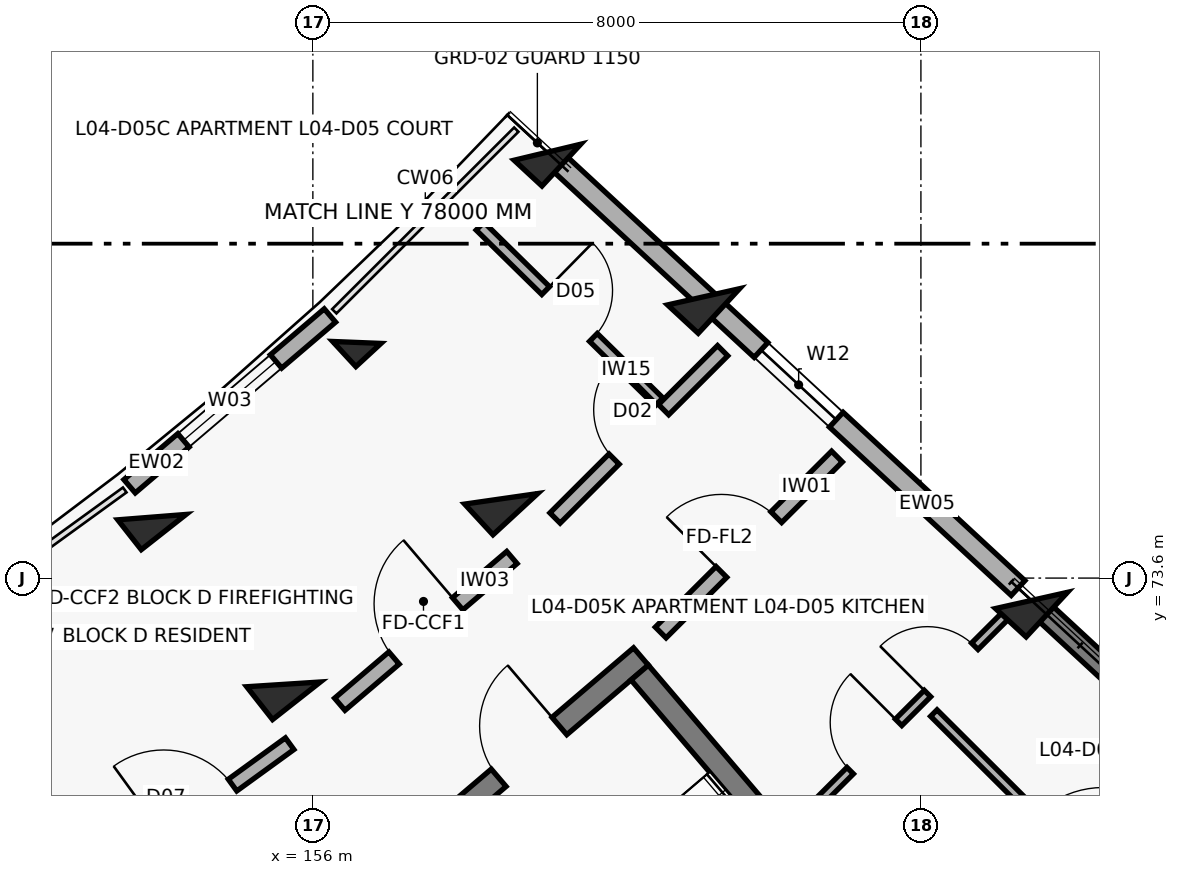
"""IFC4 building model, lengths in metres.
Left out: names, types, materials, properties, quantities, classifications, styles, units other than length and angle.
Written with IfcOpenShell. Run it as: python <this file> out.ifc"""

import sys

from ifc_helpers import new_model, si_unit, direction, frame, frame_2d, origin, origin_2d, place, context, subcontext, project, spatial, rectangle, extrude, element, fill, save


model = new_model("IFC4")
c1 = context("Model", 3, precision=1e-05, world=origin(), true_north=direction((0.0, 1.0)))
c2 = subcontext(c1, "Body", "Model", "MODEL_VIEW")
j1 = project(units=[si_unit("LENGTHUNIT", "METRE"), si_unit("PLANEANGLEUNIT", "RADIAN")], contexts=[c1])
p1 = place(None, origin())
s1 = spatial("IfcSite", under=j1, at=p1, CompositionType="ELEMENT")
p2 = place(p1, origin())
s2 = spatial("IfcBuilding", under=s1, at=p2, CompositionType="ELEMENT")
p3 = place(p2, frame((0.0, 0.0, 14.3)))
s3 = spatial("IfcBuildingStorey", under=s2, at=p3, CompositionType="ELEMENT", Elevation=14.3)
p4 = place(p3, frame((153.883, 74.402, 0.0), z_axis=(0.0, 0.0, 1.0), x_axis=(0.618408395358, -0.785856893175, 0.0)))
e1 = element("IfcColumn", 1, at=p4, inside=s3, PredefinedType="COLUMN", context=c2, shape_type="SweptSolid", body=[
    extrude(rectangle(XDim=0.5, YDim=0.75, at=origin_2d()), origin(), (0.0, 0.0, 1.0), 3.1),
])
p5 = place(p3, frame((155.614, 72.202, 0.0), z_axis=(0.0, 0.0, 1.0), x_axis=(0.618408395358, -0.785856893175, 0.0)))
e2 = element("IfcColumn", 2, at=p5, inside=s3, PredefinedType="COLUMN", context=c2, shape_type="SweptSolid", body=[
    extrude(rectangle(XDim=0.55, YDim=0.8, at=origin_2d()), origin(), (0.0, 0.0, 1.0), 3.1),
])
p6 = place(p3, frame((156.579, 76.701, 0.0), z_axis=(0.0, 0.0, 1.0), x_axis=(0.678159669868, -0.73491459515, 0.0)))
e3 = element("IfcColumn", 3, at=p6, inside=s3, PredefinedType="COLUMN", context=c2, shape_type="SweptSolid", body=[
    extrude(rectangle(XDim=0.45, YDim=0.45, at=origin_2d()), origin(), (0.0, 0.0, 1.0), 3.1),
])
for number, where, z_axis, x_axis in (
    (4, (158.477, 74.643, 0.0), (0.0, 0.0, 1.0), (0.678, -0.735, 0.0)),
    (5, (162.465, 70.322, 0.0), (0.0, 0.0, 1.0), (0.678, -0.735, 0.0)),
):
    element("IfcColumn", number, at=place(p3, frame(where, z_axis=z_axis, x_axis=x_axis)), inside=s3, PredefinedType="COLUMN", context=c2, shape_type="SweptSolid", body=[
        extrude(rectangle(XDim=0.55, YDim=0.8, at=origin_2d()), origin(), (0.0, 0.0, 1.0), 3.1),
    ])
p7 = place(p3, frame((159.086, 79.204, 0.0), z_axis=(0.0, 0.0, 1.0), x_axis=(0.733729864503, -0.679441304262, 0.0)))
e6 = element("IfcColumn", 6, at=p7, inside=s3, PredefinedType="COLUMN", context=c2, shape_type="SweptSolid", body=[
    extrude(rectangle(XDim=0.5, YDim=0.75, at=origin_2d()), origin(), (0.0, 0.0, 1.0), 3.1),
])
for number, where, z_axis, x_axis in (
    (7, (161.14, 77.301, 0.0), (0.0, 0.0, 1.0), (0.734, -0.679, 0.0)),
    (8, (165.455, 73.306, 0.0), (0.0, 0.0, 1.0), (0.734, -0.679, 0.0)),
):
    element("IfcColumn", number, at=place(p3, frame(where, z_axis=z_axis, x_axis=x_axis)), inside=s3, PredefinedType="COLUMN", context=c2, shape_type="SweptSolid", body=[
        extrude(rectangle(XDim=0.55, YDim=0.8, at=origin_2d()), origin(), (0.0, 0.0, 1.0), 3.1),
    ])
p8 = place(p3, frame((165.587, 73.184, 0.0), z_axis=(0.0, 0.0, 1.0), x_axis=(0.733739663667, -0.679430721974, 0.0)))
e9 = element("IfcWall", 9, at=p8, inside=s3, PredefinedType="SHEAR", context=c2, shape_type="SweptSolid", body=[
    extrude(rectangle(XDim=4.72, YDim=0.27, at=frame_2d((2.36, 0.0))), origin(), (0.0, 0.0, 1.0), 2.86),
])
p9 = place(p3, frame((153.589, 74.808, 0.0), z_axis=(0.0, 0.0, 1.0), x_axis=(0.760985425115, 0.648768974876, 0.0)))
e10 = element("IfcWall", 10, at=p9, inside=s3, PredefinedType="SOLIDWALL", context=c2, shape_type="SweptSolid", body=[
    extrude(rectangle(XDim=3.464, YDim=0.23, at=frame_2d((1.732, 0.0))), origin(), (0.0, 0.0, 1.0), 2.25),
])
p10 = place(p9, frame((0.932, 0.0, 0.32)))
e11 = element("IfcOpeningElement", 11, at=p10, cuts=e10, PredefinedType="OPENING", context=c2, shape_type="SweptSolid", body=[
    extrude(rectangle(XDim=1.6, YDim=1.5, at=frame_2d((0.8, 0.75))), frame((0.0, 0.125, 0.0), z_axis=(0.0, -1.0, 0.0), x_axis=(1.0, 0.0, 0.0)), (0.0, 0.0, 1.0), 0.25),
])
p11 = place(p3, frame((159.262, 79.041, 0.0), z_axis=(0.0, 0.0, 1.0), x_axis=(0.733738684326, -0.679431779595, 0.0)))
e12 = element("IfcWall", 12, at=p11, inside=s3, PredefinedType="SOLIDWALL", context=c2, shape_type="SweptSolid", body=[
    extrude(rectangle(XDim=8.2, YDim=0.265, at=frame_2d((4.1, 0.0))), origin(), (0.0, 0.0, 1.0), 2.08),
])
p12 = place(p11, frame((3.59, 0.0, 0.75)))
e13 = element("IfcOpeningElement", 13, at=p12, cuts=e12, PredefinedType="OPENING", context=c2, shape_type="SweptSolid", body=[
    extrude(rectangle(XDim=1.35, YDim=1.35, at=frame_2d((0.675, 0.675))), frame((0.0, 0.142, 0.0), z_axis=(0.0, -1.0, 0.0), x_axis=(1.0, 0.0, 0.0)), (0.0, 0.0, 1.0), 0.285),
])
p13 = place(p3, frame((157.372, 70.058, 0.0), z_axis=(0.0, 0.0, 1.0), x_axis=(0.760990583254, 0.648762924495, 0.0)))
e14 = element("IfcWall", 14, at=p13, inside=s3, PredefinedType="SHEAR", context=c2, shape_type="SweptSolid", body=[
    extrude(rectangle(XDim=3.87, YDim=0.3, at=frame_2d((1.935, 0.0))), origin(), (0.0, 0.0, 1.0), 3.1),
])
p14 = place(p13, frame((1.41, 0.0, 0.0)))
e15 = element("IfcOpeningElement", 15, at=p14, cuts=e14, PredefinedType="OPENING", context=c2, shape_type="SweptSolid", body=[
    extrude(rectangle(XDim=1.05, YDim=2.15, at=frame_2d((0.525, 1.075))), frame((0.0, 0.16, 0.0), z_axis=(0.0, -1.0, 0.0), x_axis=(1.0, 0.0, 0.0)), (0.0, 0.0, 1.0), 0.32),
])
p15 = place(p3, frame((160.3, 72.357, 0.0), z_axis=(0.0, 0.0, 1.0), x_axis=(0.648781194888, -0.760975006922, 0.0)))
e16 = element("IfcWall", 16, at=p15, inside=s3, PredefinedType="SHEAR", context=c2, shape_type="SweptSolid", body=[
    extrude(rectangle(XDim=7.69, YDim=0.3, at=frame_2d((3.845, 0.0))), origin(), (0.0, 0.0, 1.0), 3.1),
])
p16 = place(p3, frame((153.285, 69.674, 0.0), z_axis=(0.0, 0.0, 1.0), x_axis=(0.809505174959, 0.587112741911, 0.0)))
e17 = element("IfcWall", 17, at=p16, inside=s3, PredefinedType="SOLIDWALL", context=c2, shape_type="SweptSolid", body=[
    extrude(rectangle(XDim=2.976, YDim=0.19, at=frame_2d((1.488, 0.0))), origin(), (0.0, 0.0, 1.0), 2.08),
])
p17 = place(p16, frame((0.928, 0.0, 0.0)))
e18 = element("IfcOpeningElement", 18, at=p17, cuts=e17, PredefinedType="OPENING", context=c2, shape_type="SweptSolid", body=[
    extrude(rectangle(XDim=1.12, YDim=2.15, at=frame_2d((0.56, 1.075))), frame((0.0, 0.105, 0.0), z_axis=(0.0, -1.0, 0.0), x_axis=(1.0, 0.0, 0.0)), (0.0, 0.0, 1.0), 0.21),
])
p18 = place(p3, frame((156.354, 71.94, 0.0), z_axis=(0.0, 0.0, 1.0), x_axis=(0.760991187621, 0.648762215579, 0.0)))
e19 = element("IfcWall", 19, at=p18, inside=s3, PredefinedType="SOLIDWALL", context=c2, shape_type="SweptSolid", body=[
    extrude(rectangle(XDim=2.976, YDim=0.21, at=frame_2d((1.488, 0.0))), origin(), (0.0, 0.0, 1.0), 2.08),
])
p19 = place(p18, frame((0.938, 0.0, 0.0)))
e20 = element("IfcOpeningElement", 20, at=p19, cuts=e19, PredefinedType="OPENING", context=c2, shape_type="SweptSolid", body=[
    extrude(rectangle(XDim=1.1, YDim=2.15, at=frame_2d((0.55, 1.075))), frame((0.0, 0.115, 0.0), z_axis=(0.0, -1.0, 0.0), x_axis=(1.0, 0.0, 0.0)), (0.0, 0.0, 1.0), 0.23),
])
p20 = place(p3, frame((160.576, 72.884, 0.0), z_axis=(0.0, 0.0, 1.0), x_axis=(0.70773973846, 0.706473256822, 0.0)))
e21 = element("IfcWall", 21, at=p20, inside=s3, PredefinedType="SOLIDWALL", context=c2, shape_type="SweptSolid", body=[
    extrude(rectangle(XDim=3.277, YDim=0.2, at=frame_2d((1.639, 0.0))), origin(), (0.0, 0.0, 1.0), 2.08),
])
p21 = place(p20, frame((1.128, 0.0, 0.0)))
e22 = element("IfcOpeningElement", 22, at=p21, cuts=e21, PredefinedType="OPENING", context=c2, shape_type="SweptSolid", body=[
    extrude(rectangle(XDim=1.02, YDim=2.15, at=frame_2d((0.51, 1.075))), frame((0.0, 0.11, 0.0), z_axis=(0.0, -1.0, 0.0), x_axis=(1.0, 0.0, 0.0)), (0.0, 0.0, 1.0), 0.22),
])
p22 = place(p3, frame((159.186, 74.39, 0.0), z_axis=(0.0, 0.0, 1.0), x_axis=(0.70773330139, 0.706479705373, 0.0)))
e23 = element("IfcWall", 23, at=p22, inside=s3, PredefinedType="SOLIDWALL", context=c2, shape_type="SweptSolid", body=[
    extrude(rectangle(XDim=3.116, YDim=0.19, at=frame_2d((1.558, 0.0))), origin(), (0.0, 0.0, 1.0), 2.08),
])
p23 = place(p22, frame((1.098, 0.0, 0.0)))
e24 = element("IfcOpeningElement", 24, at=p23, cuts=e23, PredefinedType="OPENING", context=c2, shape_type="SweptSolid", body=[
    extrude(rectangle(XDim=0.92, YDim=2.1, at=frame_2d((0.46, 1.05))), frame((0.0, 0.105, 0.0), z_axis=(0.0, -1.0, 0.0), x_axis=(1.0, 0.0, 0.0)), (0.0, 0.0, 1.0), 0.21),
])
p24 = place(p3, frame((158.2, 78.23, 0.0), z_axis=(0.0, 0.0, 1.0), x_axis=(0.713587506757, -0.700566106945, 0.0)))
e25 = element("IfcWall", 25, at=p24, inside=s3, PredefinedType="PARTITIONING", context=c2, shape_type="SweptSolid", body=[
    extrude(rectangle(XDim=3.3, YDim=0.145, at=frame_2d((1.65, 0.0))), origin(), (0.0, 0.0, 1.0), 2.08),
])
p25 = place(p24, frame((1.21, 0.0, 0.0)))
e26 = element("IfcOpeningElement", 26, at=p25, cuts=e25, PredefinedType="OPENING", context=c2, shape_type="SweptSolid", body=[
    extrude(rectangle(XDim=0.88, YDim=2.1, at=frame_2d((0.44, 1.05))), frame((0.0, 0.083, 0.0), z_axis=(0.0, -1.0, 0.0), x_axis=(1.0, 0.0, 0.0)), (0.0, 0.0, 1.0), 0.165),
])
p26 = place(p3, frame((162.609, 70.607, 0.0), z_axis=(0.0, 0.0, 1.0), x_axis=(0.707714058013, 0.70649898237, 0.0)))
e27 = element("IfcWall", 27, at=p26, inside=s3, PredefinedType="PARTITIONING", context=c2, shape_type="SweptSolid", body=[
    extrude(rectangle(XDim=3.617, YDim=0.12, at=frame_2d((1.808, 0.0))), origin(), (0.0, 0.0, 1.0), 2.08),
])
p27 = place(p26, frame((0.65, 0.0, 0.0)))
e28 = element("IfcOpeningElement", 28, at=p27, cuts=e27, PredefinedType="OPENING", context=c2, shape_type="SweptSolid", body=[
    extrude(rectangle(XDim=0.9, YDim=2.1, at=frame_2d((0.45, 1.05))), frame((0.0, 0.07, 0.0), z_axis=(0.0, -1.0, 0.0), x_axis=(1.0, 0.0, 0.0)), (0.0, 0.0, 1.0), 0.14),
])
p28 = place(p26, frame((2.086, 0.0, 0.0)))
e29 = element("IfcOpeningElement", 29, at=p28, cuts=e27, PredefinedType="OPENING", context=c2, shape_type="SweptSolid", body=[
    extrude(rectangle(XDim=0.88, YDim=2.1, at=frame_2d((0.44, 1.05))), frame((0.0, 0.07, 0.0), z_axis=(0.0, -1.0, 0.0), x_axis=(1.0, 0.0, 0.0)), (0.0, 0.0, 1.0), 0.14),
])
p29 = place(p3, frame((164.17, 71.824, 0.0), z_axis=(0.0, 0.0, 1.0), x_axis=(0.708531494679, -0.70567919131, 0.0)))
e30 = element("IfcWall", 30, at=p29, inside=s3, PredefinedType="PARTITIONING", context=c2, shape_type="SweptSolid", body=[
    extrude(rectangle(XDim=5.05, YDim=0.12, at=frame_2d((2.525, 0.0))), origin(), (0.0, 0.0, 1.0), 2.08),
])
p30 = place(p29, frame((1.905, 0.0, 0.0)))
e31 = element("IfcOpeningElement", 31, at=p30, cuts=e30, PredefinedType="OPENING", context=c2, shape_type="SweptSolid", body=[
    extrude(rectangle(XDim=1.24, YDim=2.1, at=frame_2d((0.62, 1.05))), frame((0.0, 0.07, 0.0), z_axis=(0.0, -1.0, 0.0), x_axis=(1.0, 0.0, 0.0)), (0.0, 0.0, 1.0), 0.14),
])
p31 = place(p10, origin())
e32 = element("IfcWindow", 32, at=p31, inside=s3, PartitioningType="DOUBLE_PANEL_VERTICAL", PredefinedType="WINDOW", context=c2, shape_type="SweptSolid", body=[
    extrude(rectangle(XDim=1.6, YDim=1.5, at=frame_2d((0.8, 0.75))), frame((0.0, 0.03, 0.0), z_axis=(0.0, -1.0, 0.0), x_axis=(1.0, 0.0, 0.0)), (0.0, 0.0, 1.0), 0.06),
])
fill(e11, e32)
p32 = place(p12, origin())
e33 = element("IfcWindow", 33, at=p32, inside=s3, PartitioningType="DOUBLE_PANEL_VERTICAL", PredefinedType="WINDOW", context=c2, shape_type="SweptSolid", body=[
    extrude(rectangle(XDim=1.35, YDim=1.35, at=frame_2d((0.675, 0.675))), frame((0.0, 0.03, 0.0), z_axis=(0.0, -1.0, 0.0), x_axis=(1.0, 0.0, 0.0)), (0.0, 0.0, 1.0), 0.06),
])
fill(e13, e33)
p33 = place(p14, origin())
e34 = element("IfcDoor", 34, at=p33, inside=s3, OperationType="SINGLE_SWING_RIGHT", PredefinedType="DOOR", context=c2, shape_type="SweptSolid", body=[
    extrude(rectangle(XDim=1.05, YDim=2.15, at=frame_2d((0.525, 1.075))), frame((0.0, 0.025, 0.0), z_axis=(0.0, -1.0, 0.0), x_axis=(1.0, 0.0, 0.0)), (0.0, 0.0, 1.0), 0.05),
])
fill(e15, e34)
p34 = place(p17, origin())
e35 = element("IfcDoor", 35, at=p34, inside=s3, OperationType="SINGLE_SWING_LEFT", PredefinedType="DOOR", context=c2, shape_type="SweptSolid", body=[
    extrude(rectangle(XDim=1.12, YDim=2.15, at=frame_2d((0.56, 1.075))), frame((0.0, 0.025, 0.0), z_axis=(0.0, -1.0, 0.0), x_axis=(1.0, 0.0, 0.0)), (0.0, 0.0, 1.0), 0.05),
])
fill(e18, e35)
p35 = place(p19, origin())
e36 = element("IfcDoor", 36, at=p35, inside=s3, OperationType="SINGLE_SWING_RIGHT", PredefinedType="DOOR", context=c2, shape_type="SweptSolid", body=[
    extrude(rectangle(XDim=1.1, YDim=2.15, at=frame_2d((0.55, 1.075))), frame((0.0, 0.025, 0.0), z_axis=(0.0, -1.0, 0.0), x_axis=(1.0, 0.0, 0.0)), (0.0, 0.0, 1.0), 0.05),
])
fill(e20, e36)
p36 = place(p21, origin())
e37 = element("IfcDoor", 37, at=p36, inside=s3, OperationType="SINGLE_SWING_LEFT", PredefinedType="DOOR", context=c2, shape_type="SweptSolid", body=[
    extrude(rectangle(XDim=1.02, YDim=2.15, at=frame_2d((0.51, 1.075))), frame((0.0, 0.025, 0.0), z_axis=(0.0, -1.0, 0.0), x_axis=(1.0, 0.0, 0.0)), (0.0, 0.0, 1.0), 0.05),
])
fill(e22, e37)
p37 = place(p23, origin())
e38 = element("IfcDoor", 38, at=p37, inside=s3, OperationType="SINGLE_SWING_RIGHT", PredefinedType="DOOR", context=c2, shape_type="SweptSolid", body=[
    extrude(rectangle(XDim=0.92, YDim=2.1, at=frame_2d((0.46, 1.05))), frame((0.0, 0.025, 0.0), z_axis=(0.0, -1.0, 0.0), x_axis=(1.0, 0.0, 0.0)), (0.0, 0.0, 1.0), 0.05),
])
fill(e24, e38)
p38 = place(p25, origin())
e39 = element("IfcDoor", 39, at=p38, inside=s3, OperationType="SINGLE_SWING_LEFT", PredefinedType="DOOR", context=c2, shape_type="SweptSolid", body=[
    extrude(rectangle(XDim=0.88, YDim=2.1, at=frame_2d((0.44, 1.05))), frame((0.0, 0.025, 0.0), z_axis=(0.0, -1.0, 0.0), x_axis=(1.0, 0.0, 0.0)), (0.0, 0.0, 1.0), 0.05),
])
fill(e26, e39)
p39 = place(p27, origin())
e40 = element("IfcDoor", 40, at=p39, inside=s3, OperationType="SINGLE_SWING_RIGHT", PredefinedType="DOOR", context=c2, shape_type="SweptSolid", body=[
    extrude(rectangle(XDim=0.9, YDim=2.1, at=frame_2d((0.45, 1.05))), frame((0.0, 0.025, 0.0), z_axis=(0.0, -1.0, 0.0), x_axis=(1.0, 0.0, 0.0)), (0.0, 0.0, 1.0), 0.05),
])
fill(e28, e40)
p40 = place(p28, origin())
e41 = element("IfcDoor", 41, at=p40, inside=s3, OperationType="SINGLE_SWING_LEFT", PredefinedType="DOOR", context=c2, shape_type="SweptSolid", body=[
    extrude(rectangle(XDim=0.88, YDim=2.1, at=frame_2d((0.44, 1.05))), frame((0.0, 0.025, 0.0), z_axis=(0.0, -1.0, 0.0), x_axis=(1.0, 0.0, 0.0)), (0.0, 0.0, 1.0), 0.05),
])
fill(e29, e41)
save(model, sys.argv[1])
